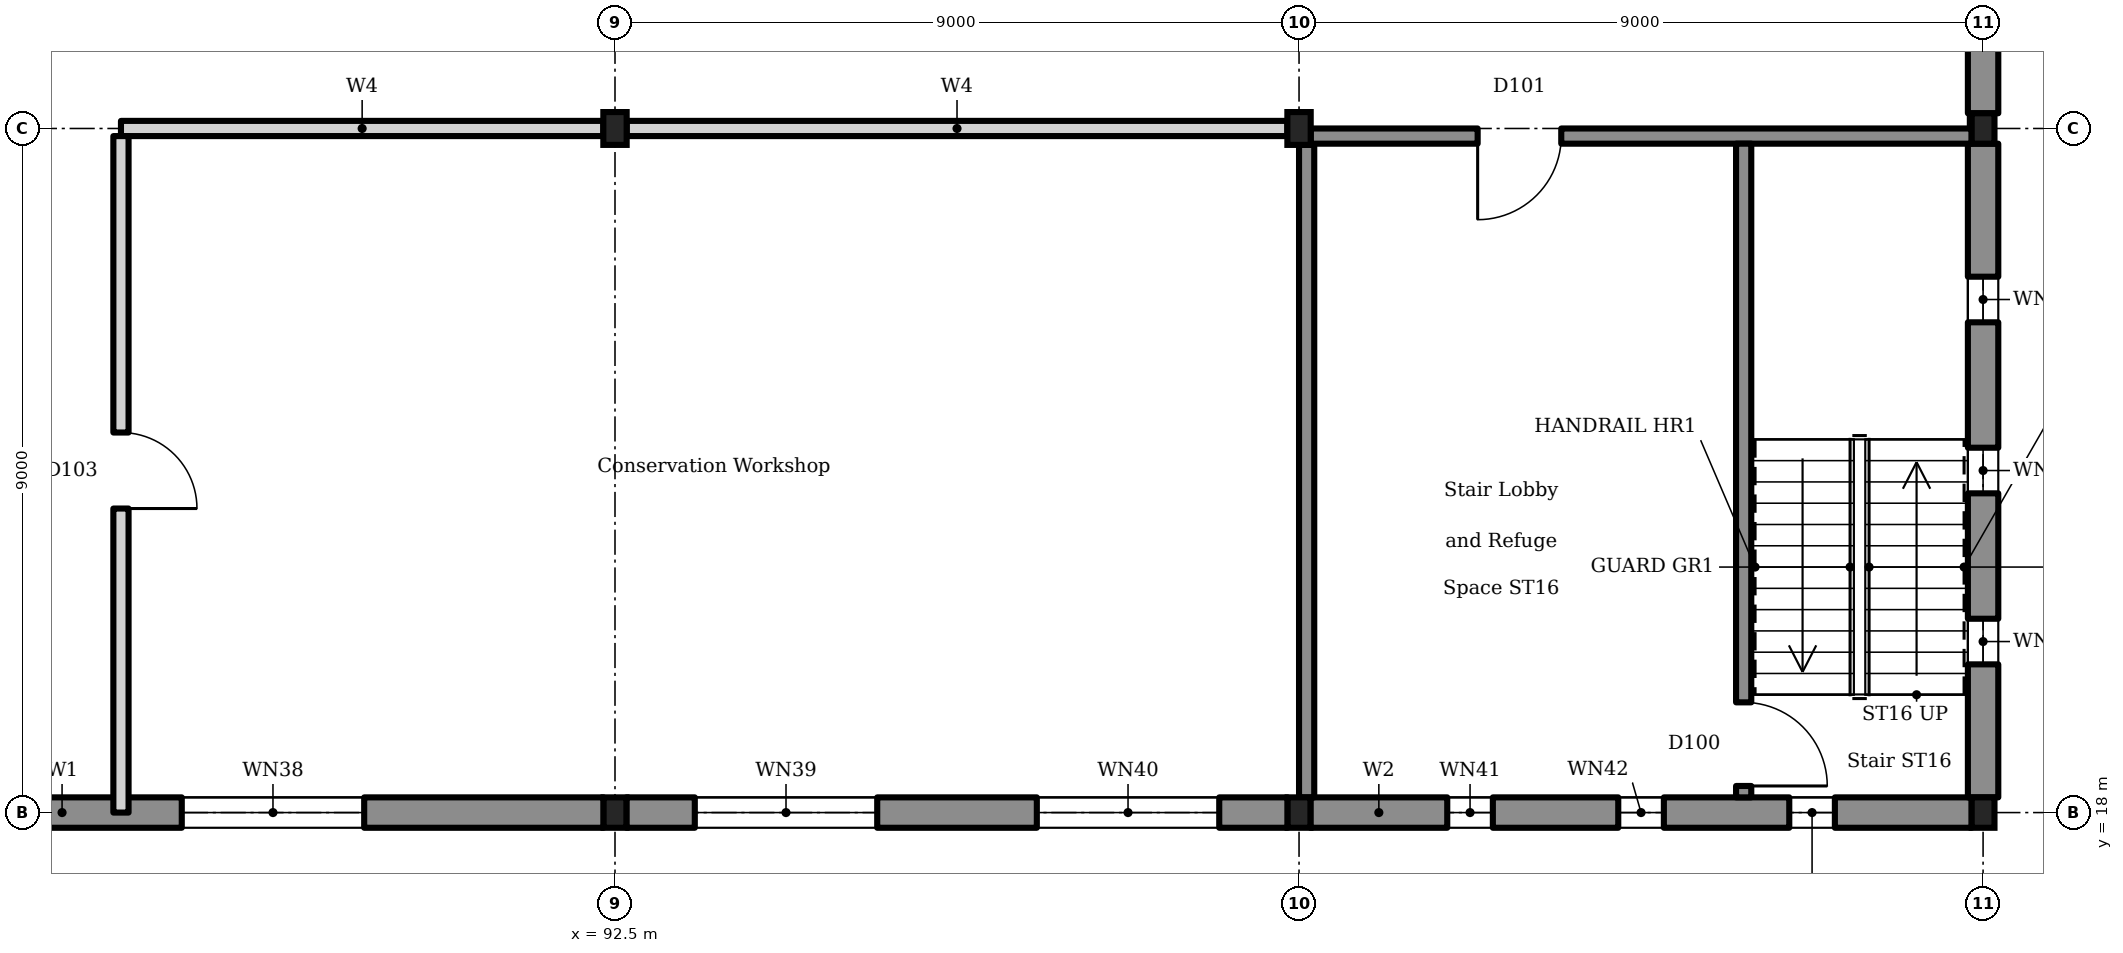
"""IFC4 building model, lengths in metres.
Left out: names, types, materials, properties, quantities, classifications, styles, units other than length and angle.
Written with IfcOpenShell. Run it as: python <this file> out.ifc"""

import sys

from ifc_helpers import new_model, si_unit, direction, frame, frame_2d, origin, origin_2d, place, context, subcontext, project, spatial, rectangle, i_section, extrude, element, fill, save


model = new_model("IFC4")
c1 = context("Model", 3, precision=1e-05, world=origin(), true_north=direction((0.0, 1.0)))
c2 = subcontext(c1, "Body", "Model", "MODEL_VIEW")
j1 = project(units=[si_unit("LENGTHUNIT", "METRE"), si_unit("PLANEANGLEUNIT", "RADIAN")], contexts=[c1])
p1 = place(None, origin())
s1 = spatial("IfcSite", under=j1, at=p1, CompositionType="ELEMENT")
p2 = place(p1, origin())
s2 = spatial("IfcBuilding", under=s1, at=p2, CompositionType="ELEMENT")
p3 = place(p2, frame((0.0, 0.0, 5.4)))
s3 = spatial("IfcBuildingStorey", under=s2, at=p3, CompositionType="ELEMENT", Elevation=5.4)
for number, where, z_axis, x_axis in (
    (1, (92.5, 18.0, 0.0), (0.0, 0.0, 1.0), (1.0, 0.0, 0.0)),
    (2, (101.5, 18.0, 0.0), (0.0, 0.0, 1.0), (1.0, 0.0, 0.0)),
    (3, (110.5, 18.0, 0.0), (0.0, 0.0, 1.0), (1.0, 0.0, 0.0)),
):
    element("IfcColumn", number, at=place(p3, frame(where, z_axis=z_axis, x_axis=x_axis)), inside=s3, PredefinedType="COLUMN", context=c2, shape_type="SweptSolid", body=[
        extrude(i_section(OverallWidth=0.3, OverallDepth=0.4, WebThickness=0.013, FlangeThickness=0.024, FilletRadius=0.027, at=origin_2d()), origin(), (0.0, 0.0, 1.0), 4.5),
    ])
for number, where, z_axis, x_axis in (
    (4, (92.5, 27.0, 0.0), (0.0, 0.0, 1.0), (1.0, 0.0, 0.0)),
    (5, (101.5, 27.0, 0.0), (0.0, 0.0, 1.0), (1.0, 0.0, 0.0)),
):
    element("IfcColumn", number, at=place(p3, frame(where, z_axis=z_axis, x_axis=x_axis)), inside=s3, PredefinedType="COLUMN", context=c2, shape_type="SweptSolid", body=[
        extrude(i_section(OverallWidth=0.307, OverallDepth=0.432, WebThickness=0.021, FlangeThickness=0.04, FilletRadius=0.027, at=origin_2d()), origin(), (0.0, 0.0, 1.0), 4.5),
    ])
p4 = place(p3, frame((110.5, 27.0, 0.0), z_axis=(0.0, 0.0, 1.0), x_axis=(1.0, 0.0, 0.0)))
e6 = element("IfcColumn", 6, at=p4, inside=s3, PredefinedType="COLUMN", context=c2, shape_type="SweptSolid", body=[
    extrude(i_section(OverallWidth=0.3, OverallDepth=0.4, WebThickness=0.013, FlangeThickness=0.024, FilletRadius=0.027, at=origin_2d()), origin(), (0.0, 0.0, 1.0), 4.5),
])
p5 = place(p3, frame((83.65, 18.0, 0.0), z_axis=(0.0, 0.0, 1.0), x_axis=(1.0, 0.0, 0.0)))
e7 = element("IfcWall", 7, at=p5, inside=s3, PredefinedType="SOLIDWALL", context=c2, shape_type="SweptSolid", body=[
    extrude(rectangle(XDim=8.7, YDim=0.4, at=frame_2d((4.35, 0.0))), origin(), (0.0, 0.0, 1.0), 4.5),
])
p6 = place(p5, frame((3.15, 0.0, 2.6)))
e8 = element("IfcOpeningElement", 8, at=p6, cuts=e7, PredefinedType="OPENING", context=c2, shape_type="SweptSolid", body=[
    extrude(rectangle(XDim=2.4, YDim=1.0, at=frame_2d((1.2, 0.5))), frame((0.0, 0.21, 0.0), z_axis=(0.0, -1.0, 0.0), x_axis=(1.0, 0.0, 0.0)), (0.0, 0.0, 1.0), 0.42),
])
p7 = place(p3, frame((92.65, 18.0, 0.0), z_axis=(0.0, 0.0, 1.0), x_axis=(1.0, 0.0, 0.0)))
e9 = element("IfcWall", 9, at=p7, inside=s3, PredefinedType="SOLIDWALL", context=c2, shape_type="SweptSolid", body=[
    extrude(rectangle(XDim=8.7, YDim=0.4, at=frame_2d((4.35, 0.0))), origin(), (0.0, 0.0, 1.0), 4.5),
])
p8 = place(p7, frame((0.9, 0.0, 2.6)))
e10 = element("IfcOpeningElement", 10, at=p8, cuts=e9, PredefinedType="OPENING", context=c2, shape_type="SweptSolid", body=[
    extrude(rectangle(XDim=2.4, YDim=1.0, at=frame_2d((1.2, 0.5))), frame((0.0, 0.21, 0.0), z_axis=(0.0, -1.0, 0.0), x_axis=(1.0, 0.0, 0.0)), (0.0, 0.0, 1.0), 0.42),
])
p9 = place(p7, frame((5.4, 0.0, 2.6)))
e11 = element("IfcOpeningElement", 11, at=p9, cuts=e9, PredefinedType="OPENING", context=c2, shape_type="SweptSolid", body=[
    extrude(rectangle(XDim=2.4, YDim=1.0, at=frame_2d((1.2, 0.5))), frame((0.0, 0.21, 0.0), z_axis=(0.0, -1.0, 0.0), x_axis=(1.0, 0.0, 0.0)), (0.0, 0.0, 1.0), 0.42),
])
p10 = place(p3, frame((101.65, 18.0, 0.0), z_axis=(0.0, 0.0, 1.0), x_axis=(1.0, 0.0, 0.0)))
e12 = element("IfcWall", 12, at=p10, inside=s3, PredefinedType="SOLIDWALL", context=c2, shape_type="SweptSolid", body=[
    extrude(rectangle(XDim=8.7, YDim=0.4, at=frame_2d((4.35, 0.0))), origin(), (0.0, 0.0, 1.0), 4.5),
])
p11 = place(p10, frame((1.8, 0.0, 0.9)))
e13 = element("IfcOpeningElement", 13, at=p11, cuts=e12, PredefinedType="OPENING", context=c2, shape_type="SweptSolid", body=[
    extrude(rectangle(XDim=0.6, YDim=2.4, at=frame_2d((0.3, 1.2))), frame((0.0, 0.21, 0.0), z_axis=(0.0, -1.0, 0.0), x_axis=(1.0, 0.0, 0.0)), (0.0, 0.0, 1.0), 0.42),
])
p12 = place(p10, frame((4.05, 0.0, 0.9)))
e14 = element("IfcOpeningElement", 14, at=p12, cuts=e12, PredefinedType="OPENING", context=c2, shape_type="SweptSolid", body=[
    extrude(rectangle(XDim=0.6, YDim=2.4, at=frame_2d((0.3, 1.2))), frame((0.0, 0.21, 0.0), z_axis=(0.0, -1.0, 0.0), x_axis=(1.0, 0.0, 0.0)), (0.0, 0.0, 1.0), 0.42),
])
p13 = place(p10, frame((6.3, 0.0, 0.9)))
e15 = element("IfcOpeningElement", 15, at=p13, cuts=e12, PredefinedType="OPENING", context=c2, shape_type="SweptSolid", body=[
    extrude(rectangle(XDim=0.6, YDim=2.4, at=frame_2d((0.3, 1.2))), frame((0.0, 0.21, 0.0), z_axis=(0.0, -1.0, 0.0), x_axis=(1.0, 0.0, 0.0)), (0.0, 0.0, 1.0), 0.42),
])
p14 = place(p3, frame((110.5, 18.2, 0.0), z_axis=(0.0, 0.0, 1.0), x_axis=(0.0, 1.0, 0.0)))
e16 = element("IfcWall", 16, at=p14, inside=s3, PredefinedType="SOLIDWALL", context=c2, shape_type="SweptSolid", body=[
    extrude(rectangle(XDim=8.6, YDim=0.4, at=frame_2d((4.3, 0.0))), origin(), (0.0, 0.0, 1.0), 4.5),
])
p15 = place(p14, frame((1.75, 0.0, 0.9)))
e17 = element("IfcOpeningElement", 17, at=p15, cuts=e16, PredefinedType="OPENING", context=c2, shape_type="SweptSolid", body=[
    extrude(rectangle(XDim=0.6, YDim=2.4, at=frame_2d((0.3, 1.2))), frame((0.0, 0.21, 0.0), z_axis=(0.0, -1.0, 0.0), x_axis=(1.0, 0.0, 0.0)), (0.0, 0.0, 1.0), 0.42),
])
p16 = place(p14, frame((4.0, 0.0, 0.9)))
e18 = element("IfcOpeningElement", 18, at=p16, cuts=e16, PredefinedType="OPENING", context=c2, shape_type="SweptSolid", body=[
    extrude(rectangle(XDim=0.6, YDim=2.4, at=frame_2d((0.3, 1.2))), frame((0.0, 0.21, 0.0), z_axis=(0.0, -1.0, 0.0), x_axis=(1.0, 0.0, 0.0)), (0.0, 0.0, 1.0), 0.42),
])
p17 = place(p14, frame((6.25, 0.0, 0.9)))
e19 = element("IfcOpeningElement", 19, at=p17, cuts=e16, PredefinedType="OPENING", context=c2, shape_type="SweptSolid", body=[
    extrude(rectangle(XDim=0.6, YDim=2.4, at=frame_2d((0.3, 1.2))), frame((0.0, 0.21, 0.0), z_axis=(0.0, -1.0, 0.0), x_axis=(1.0, 0.0, 0.0)), (0.0, 0.0, 1.0), 0.42),
])
p18 = place(p3, frame((110.5, 27.2, 0.0), z_axis=(0.0, 0.0, 1.0), x_axis=(0.0, 1.0, 0.0)))
e20 = element("IfcWall", 20, at=p18, inside=s3, PredefinedType="SOLIDWALL", context=c2, shape_type="SweptSolid", body=[
    extrude(rectangle(XDim=8.6, YDim=0.4, at=frame_2d((4.3, 0.0))), origin(), (0.0, 0.0, 1.0), 4.5),
])
p19 = place(p18, frame((5.8, 0.0, 1.0)))
e21 = element("IfcOpeningElement", 21, at=p19, cuts=e20, PredefinedType="OPENING", context=c2, shape_type="SweptSolid", body=[
    extrude(rectangle(XDim=1.5, YDim=1.2, at=frame_2d((0.75, 0.6))), frame((0.0, 0.21, 0.0), z_axis=(0.0, -1.0, 0.0), x_axis=(1.0, 0.0, 0.0)), (0.0, 0.0, 1.0), 0.42),
])
p20 = place(p3, frame((101.654, 26.9, 0.0), z_axis=(0.0, 0.0, 1.0), x_axis=(1.0, 0.0, 0.0)))
e22 = element("IfcWall", 22, at=p20, inside=s3, PredefinedType="SOLIDWALL", context=c2, shape_type="SweptSolid", body=[
    extrude(rectangle(XDim=8.697, YDim=0.2, at=frame_2d((4.348, 0.0))), origin(), (0.0, 0.0, 1.0), 4.25),
])
p21 = place(p20, frame((2.197, 0.0, 0.0)))
e23 = element("IfcOpeningElement", 23, at=p21, cuts=e22, PredefinedType="OPENING", context=c2, shape_type="SweptSolid", body=[
    extrude(rectangle(XDim=1.1, YDim=2.1, at=frame_2d((0.55, 1.05))), frame((0.0, 0.11, 0.0), z_axis=(0.0, -1.0, 0.0), x_axis=(1.0, 0.0, 0.0)), (0.0, 0.0, 1.0), 0.22),
])
p22 = place(p3, frame((101.6, 18.2, 0.0), z_axis=(0.0, 0.0, 1.0), x_axis=(0.0, 1.0, 0.0)))
e24 = element("IfcWall", 24, at=p22, inside=s3, PredefinedType="SOLIDWALL", context=c2, shape_type="SweptSolid", body=[
    extrude(rectangle(XDim=8.584, YDim=0.2, at=frame_2d((4.292, 0.0))), origin(), (0.0, 0.0, 1.0), 4.25),
])
p23 = place(p3, frame((107.35, 18.2, 0.0), z_axis=(0.0, 0.0, 1.0), x_axis=(0.0, 1.0, 0.0)))
e25 = element("IfcWall", 25, at=p23, inside=s3, PredefinedType="SOLIDWALL", context=c2, shape_type="SweptSolid", body=[
    extrude(rectangle(XDim=8.6, YDim=0.2, at=frame_2d((4.3, 0.0))), origin(), (0.0, 0.0, 1.0), 4.25),
])
p24 = place(p23, frame((0.15, 0.0, 0.0)))
e26 = element("IfcOpeningElement", 26, at=p24, cuts=e25, PredefinedType="OPENING", context=c2, shape_type="SweptSolid", body=[
    extrude(rectangle(XDim=1.1, YDim=2.1, at=frame_2d((0.55, 1.05))), frame((0.0, 0.11, 0.0), z_axis=(0.0, -1.0, 0.0), x_axis=(1.0, 0.0, 0.0)), (0.0, 0.0, 1.0), 0.22),
])
p25 = place(p3, frame((86.0, 27.0, 0.0), z_axis=(0.0, 0.0, 1.0), x_axis=(1.0, 0.0, 0.0)))
e27 = element("IfcWall", 27, at=p25, inside=s3, PredefinedType="SOLIDWALL", context=c2, shape_type="SweptSolid", body=[
    extrude(rectangle(XDim=6.346, YDim=0.2, at=frame_2d((3.173, 0.0))), origin(), (0.0, 0.0, 1.0), 3.6),
])
p26 = place(p3, frame((92.654, 27.0, 0.0), z_axis=(0.0, 0.0, 1.0), x_axis=(1.0, 0.0, 0.0)))
e28 = element("IfcWall", 28, at=p26, inside=s3, PredefinedType="SOLIDWALL", context=c2, shape_type="SweptSolid", body=[
    extrude(rectangle(XDim=8.693, YDim=0.2, at=frame_2d((4.346, 0.0))), origin(), (0.0, 0.0, 1.0), 3.6),
])
p27 = place(p3, frame((86.0, 18.0, 0.0), z_axis=(0.0, 0.0, 1.0), x_axis=(0.0, 1.0, 0.0)))
e29 = element("IfcWall", 29, at=p27, inside=s3, PredefinedType="SOLIDWALL", context=c2, shape_type="SweptSolid", body=[
    extrude(rectangle(XDim=8.9, YDim=0.2, at=frame_2d((4.45, 0.0))), origin(), (0.0, 0.0, 1.0), 3.6),
])
p28 = place(p27, frame((4.0, 0.0, 0.0)))
e30 = element("IfcOpeningElement", 30, at=p28, cuts=e29, PredefinedType="OPENING", context=c2, shape_type="SweptSolid", body=[
    extrude(rectangle(XDim=1.0, YDim=2.1, at=frame_2d((0.5, 1.05))), frame((0.0, 0.11, 0.0), z_axis=(0.0, -1.0, 0.0), x_axis=(1.0, 0.0, 0.0)), (0.0, 0.0, 1.0), 0.22),
])
p29 = place(p6, origin())
e31 = element("IfcWindow", 31, at=p29, inside=s3, PartitioningType="SINGLE_PANEL", PredefinedType="WINDOW", context=c2, shape_type="SweptSolid", body=[
    extrude(rectangle(XDim=2.4, YDim=1.0, at=frame_2d((1.2, 0.5))), frame((0.0, 0.03, 0.0), z_axis=(0.0, -1.0, 0.0), x_axis=(1.0, 0.0, 0.0)), (0.0, 0.0, 1.0), 0.06),
])
fill(e8, e31)
p30 = place(p8, origin())
e32 = element("IfcWindow", 32, at=p30, inside=s3, PartitioningType="SINGLE_PANEL", PredefinedType="WINDOW", context=c2, shape_type="SweptSolid", body=[
    extrude(rectangle(XDim=2.4, YDim=1.0, at=frame_2d((1.2, 0.5))), frame((0.0, 0.03, 0.0), z_axis=(0.0, -1.0, 0.0), x_axis=(1.0, 0.0, 0.0)), (0.0, 0.0, 1.0), 0.06),
])
fill(e10, e32)
p31 = place(p9, origin())
e33 = element("IfcWindow", 33, at=p31, inside=s3, PartitioningType="SINGLE_PANEL", PredefinedType="WINDOW", context=c2, shape_type="SweptSolid", body=[
    extrude(rectangle(XDim=2.4, YDim=1.0, at=frame_2d((1.2, 0.5))), frame((0.0, 0.03, 0.0), z_axis=(0.0, -1.0, 0.0), x_axis=(1.0, 0.0, 0.0)), (0.0, 0.0, 1.0), 0.06),
])
fill(e11, e33)
p32 = place(p11, origin())
e34 = element("IfcWindow", 34, at=p32, inside=s3, PartitioningType="SINGLE_PANEL", PredefinedType="WINDOW", context=c2, shape_type="SweptSolid", body=[
    extrude(rectangle(XDim=0.6, YDim=2.4, at=frame_2d((0.3, 1.2))), frame((0.0, 0.03, 0.0), z_axis=(0.0, -1.0, 0.0), x_axis=(1.0, 0.0, 0.0)), (0.0, 0.0, 1.0), 0.06),
])
fill(e13, e34)
p33 = place(p12, origin())
e35 = element("IfcWindow", 35, at=p33, inside=s3, PartitioningType="SINGLE_PANEL", PredefinedType="WINDOW", context=c2, shape_type="SweptSolid", body=[
    extrude(rectangle(XDim=0.6, YDim=2.4, at=frame_2d((0.3, 1.2))), frame((0.0, 0.03, 0.0), z_axis=(0.0, -1.0, 0.0), x_axis=(1.0, 0.0, 0.0)), (0.0, 0.0, 1.0), 0.06),
])
fill(e14, e35)
p34 = place(p13, origin())
e36 = element("IfcWindow", 36, at=p34, inside=s3, PartitioningType="SINGLE_PANEL", PredefinedType="WINDOW", context=c2, shape_type="SweptSolid", body=[
    extrude(rectangle(XDim=0.6, YDim=2.4, at=frame_2d((0.3, 1.2))), frame((0.0, 0.03, 0.0), z_axis=(0.0, -1.0, 0.0), x_axis=(1.0, 0.0, 0.0)), (0.0, 0.0, 1.0), 0.06),
])
fill(e15, e36)
p35 = place(p15, origin())
e37 = element("IfcWindow", 37, at=p35, inside=s3, PartitioningType="SINGLE_PANEL", PredefinedType="WINDOW", context=c2, shape_type="SweptSolid", body=[
    extrude(rectangle(XDim=0.6, YDim=2.4, at=frame_2d((0.3, 1.2))), frame((0.0, 0.03, 0.0), z_axis=(0.0, -1.0, 0.0), x_axis=(1.0, 0.0, 0.0)), (0.0, 0.0, 1.0), 0.06),
])
fill(e17, e37)
p36 = place(p16, origin())
e38 = element("IfcWindow", 38, at=p36, inside=s3, PartitioningType="SINGLE_PANEL", PredefinedType="WINDOW", context=c2, shape_type="SweptSolid", body=[
    extrude(rectangle(XDim=0.6, YDim=2.4, at=frame_2d((0.3, 1.2))), frame((0.0, 0.03, 0.0), z_axis=(0.0, -1.0, 0.0), x_axis=(1.0, 0.0, 0.0)), (0.0, 0.0, 1.0), 0.06),
])
fill(e18, e38)
p37 = place(p17, origin())
e39 = element("IfcWindow", 39, at=p37, inside=s3, PartitioningType="SINGLE_PANEL", PredefinedType="WINDOW", context=c2, shape_type="SweptSolid", body=[
    extrude(rectangle(XDim=0.6, YDim=2.4, at=frame_2d((0.3, 1.2))), frame((0.0, 0.03, 0.0), z_axis=(0.0, -1.0, 0.0), x_axis=(1.0, 0.0, 0.0)), (0.0, 0.0, 1.0), 0.06),
])
fill(e19, e39)
p38 = place(p24, frame((1.1, 0.0, 0.0), z_axis=(0.0, 0.0, 1.0), x_axis=(-1.0, 0.0, 0.0)))
e40 = element("IfcDoor", 40, at=p38, inside=s3, OperationType="SINGLE_SWING_LEFT", PredefinedType="DOOR", context=c2, shape_type="SweptSolid", body=[
    extrude(rectangle(XDim=1.1, YDim=2.1, at=frame_2d((0.55, 1.05))), frame((0.0, 0.025, 0.0), z_axis=(0.0, -1.0, 0.0), x_axis=(1.0, 0.0, 0.0)), (0.0, 0.0, 1.0), 0.05),
])
fill(e26, e40)
p39 = place(p21, frame((1.1, 0.0, 0.0), z_axis=(0.0, 0.0, 1.0), x_axis=(-1.0, 0.0, 0.0)))
e41 = element("IfcDoor", 41, at=p39, inside=s3, OperationType="SINGLE_SWING_LEFT", PredefinedType="DOOR", context=c2, shape_type="SweptSolid", body=[
    extrude(rectangle(XDim=1.1, YDim=2.1, at=frame_2d((0.55, 1.05))), frame((0.0, 0.025, 0.0), z_axis=(0.0, -1.0, 0.0), x_axis=(1.0, 0.0, 0.0)), (0.0, 0.0, 1.0), 0.05),
])
fill(e23, e41)
p40 = place(p28, frame((1.0, 0.0, 0.0), z_axis=(0.0, 0.0, 1.0), x_axis=(-1.0, 0.0, 0.0)))
e42 = element("IfcDoor", 42, at=p40, inside=s3, OperationType="SINGLE_SWING_LEFT", PredefinedType="DOOR", context=c2, shape_type="SweptSolid", body=[
    extrude(rectangle(XDim=1.0, YDim=2.1, at=frame_2d((0.5, 1.05))), frame((0.0, 0.025, 0.0), z_axis=(0.0, -1.0, 0.0), x_axis=(1.0, 0.0, 0.0)), (0.0, 0.0, 1.0), 0.05),
])
fill(e30, e42)
save(model, sys.argv[1])
